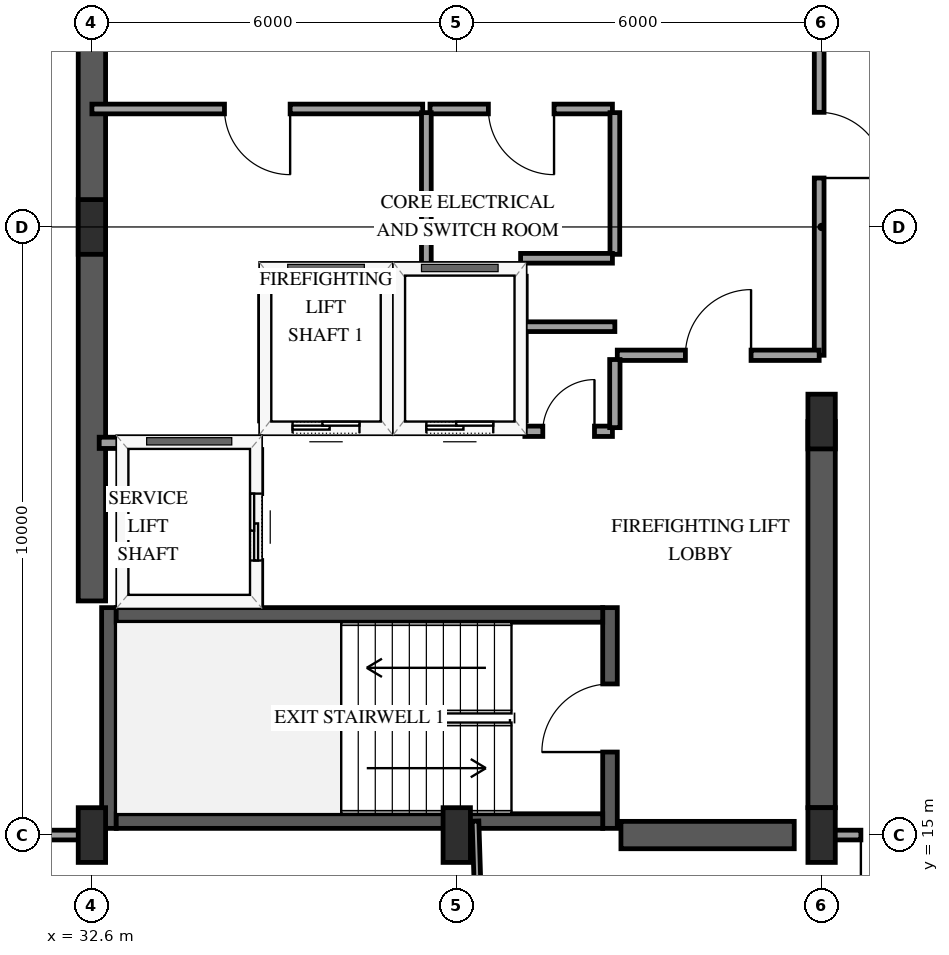
"""IFC4 building model, lengths in metres.
Left out: names, types, materials, properties, quantities, classifications, styles, units other than length and angle.
Written with IfcOpenShell. Run it as: python <this file> out.ifc"""

import sys

from ifc_helpers import new_model, si_unit, direction, frame, frame_2d, origin, origin_2d, place, context, subcontext, project, spatial, rectangle, extrude, element, fill, save


model = new_model("IFC4")
c1 = context("Model", 3, precision=1e-05, world=origin(), true_north=direction((0.0, 1.0)))
c2 = subcontext(c1, "Body", "Model", "MODEL_VIEW")
j1 = project(units=[si_unit("LENGTHUNIT", "METRE"), si_unit("PLANEANGLEUNIT", "RADIAN")], contexts=[c1])
p1 = place(None, origin())
s1 = spatial("IfcSite", under=j1, at=p1, CompositionType="ELEMENT")
p2 = place(p1, origin())
s2 = spatial("IfcBuilding", under=s1, at=p2, CompositionType="ELEMENT")
p3 = place(p2, frame((0.0, 0.0, 257.5)))
s3 = spatial("IfcBuildingStorey", under=s2, at=p3, CompositionType="ELEMENT", Elevation=257.5)
p4 = place(p3, frame((32.88, 15.11, 0.0), z_axis=(0.0, 0.0, 1.0), x_axis=(0.0, 1.0, 0.0)))
e1 = element("IfcWall", 1, at=p4, inside=s3, PredefinedType="SHEAR", context=c2, shape_type="SweptSolid", body=[
    extrude(rectangle(XDim=3.63, YDim=0.24, at=frame_2d((1.815, 0.0))), origin(), (0.0, 0.0, 1.0), 3.75),
])
p5 = place(p3, frame((41.12, 15.11, 0.0), z_axis=(0.0, 0.0, 1.0), x_axis=(0.0, 1.0, 0.0)))
e2 = element("IfcWall", 2, at=p5, inside=s3, PredefinedType="SHEAR", context=c2, shape_type="SweptSolid", body=[
    extrude(rectangle(XDim=3.63, YDim=0.24, at=frame_2d((1.815, 0.0))), origin(), (0.0, 0.0, 1.0), 3.75),
])
p6 = place(p5, frame((1.255, 0.0, 0.0)))
e3 = element("IfcOpeningElement", 3, at=p6, cuts=e2, PredefinedType="OPENING", context=c2, shape_type="SweptSolid", body=[
    extrude(rectangle(XDim=1.12, YDim=2.15, at=frame_2d((0.56, 1.075))), frame((0.0, 0.13, 0.0), z_axis=(0.0, -1.0, 0.0), x_axis=(1.0, 0.0, 0.0)), (0.0, 0.0, 1.0), 0.26),
])
for number, where, z_axis, x_axis in (
    (4, (33.0, 15.23, 0.0), (0.0, 0.0, 1.0), (1.0, 0.0, 0.0)),
    (5, (33.0, 18.62, 0.0), (0.0, 0.0, 1.0), (1.0, 0.0, 0.0)),
):
    element("IfcWall", number, at=place(p3, frame(where, z_axis=z_axis, x_axis=x_axis)), inside=s3, PredefinedType="SHEAR", context=c2, shape_type="SweptSolid", body=[
        extrude(rectangle(XDim=8.0, YDim=0.24, at=frame_2d((4.0, 0.0))), origin(), (0.0, 0.0, 1.0), 3.75),
    ])
p7 = place(p3, frame((32.6, 18.85, 0.0), z_axis=(0.0, 0.0, 1.0), x_axis=(0.0, 1.0, 0.0)))
e6 = element("IfcWall", 6, at=p7, inside=s3, PredefinedType="SHEAR", context=c2, shape_type="SweptSolid", body=[
    extrude(rectangle(XDim=12.3, YDim=0.45, at=frame_2d((6.15, 0.0))), origin(), (0.0, 0.0, 1.0), 3.75),
])
p8 = place(p3, frame((41.3, 15.0, 0.0), z_axis=(0.0, 0.0, 1.0), x_axis=(1.0, 0.0, 0.0)))
e7 = element("IfcWall", 7, at=p8, inside=s3, PredefinedType="SHEAR", context=c2, shape_type="SweptSolid", body=[
    extrude(rectangle(XDim=2.85, YDim=0.45, at=frame_2d((1.425, 0.0))), origin(), (0.0, 0.0, 1.0), 3.75),
])
p9 = place(p3, frame((44.6, 15.45, 0.0), z_axis=(0.0, 0.0, 1.0), x_axis=(0.0, 1.0, 0.0)))
e8 = element("IfcWall", 8, at=p9, inside=s3, PredefinedType="SHEAR", context=c2, shape_type="SweptSolid", body=[
    extrude(rectangle(XDim=6.35, YDim=0.45, at=frame_2d((3.175, 0.0))), origin(), (0.0, 0.0, 1.0), 3.75),
])
for number, where, z_axis, x_axis in (
    (9, (32.6, 15.0, 0.0), (0.0, 0.0, 1.0), (1.0, 0.0, 0.0)),
    (10, (32.6, 25.0, 0.0), (0.0, 0.0, 1.0), (1.0, 0.0, 0.0)),
    (11, (38.6, 15.0, 0.0), (0.0, 0.0, 1.0), (1.0, 0.0, 0.0)),
    (12, (44.6, 15.0, 0.0), (0.0, 0.0, 1.0), (1.0, 0.0, 0.0)),
    (13, (44.6, 21.8, 0.0), (0.0, 0.0, 1.0), (1.0, 0.0, 0.0)),
):
    element("IfcColumn", number, at=place(p3, frame(where, z_axis=z_axis, x_axis=x_axis)), inside=s3, PredefinedType="PILASTER", context=c2, shape_type="SweptSolid", body=[
        extrude(rectangle(XDim=0.45, YDim=0.9, at=origin_2d()), origin(), (0.0, 0.0, 1.0), 3.75),
    ])
p10 = place(p3, frame((35.45, 21.7, 0.0), z_axis=(0.0, 0.0, 1.0), x_axis=(1.0, 0.0, 0.0)))
e14 = element("IfcWall", 14, at=p10, inside=s3, PredefinedType="SOLIDWALL", context=c2, shape_type="SweptSolid", body=[
    extrude(rectangle(XDim=2.0, YDim=0.185, at=frame_2d((1.0, 0.0))), origin(), (0.0, 0.0, 1.0), 2.824),
])
p11 = place(p10, frame((0.45, 0.0, 0.0)))
e15 = element("IfcOpeningElement", 15, at=p11, cuts=e14, PredefinedType="OPENING", context=c2, shape_type="SweptSolid", body=[
    extrude(rectangle(XDim=1.1, YDim=2.15, at=frame_2d((0.55, 1.075))), frame((0.0, 0.103, 0.0), z_axis=(0.0, -1.0, 0.0), x_axis=(1.0, 0.0, 0.0)), (0.0, 0.0, 1.0), 0.205),
])
p12 = place(p3, frame((35.45, 24.3, 0.0), z_axis=(0.0, 0.0, 1.0), x_axis=(1.0, 0.0, 0.0)))
e16 = element("IfcWall", 16, at=p12, inside=s3, PredefinedType="SOLIDWALL", context=c2, shape_type="SweptSolid", body=[
    extrude(rectangle(XDim=2.0, YDim=0.185, at=frame_2d((1.0, 0.0))), origin(), (0.0, 0.0, 1.0), 2.824),
])
for number, where, z_axis, x_axis in (
    (17, (35.45, 21.81, 0.0), (0.0, 0.0, 1.0), (0.0, 1.0, 0.0)),
    (18, (37.45, 21.81, 0.0), (0.0, 0.0, 1.0), (0.0, 1.0, 0.0)),
):
    element("IfcWall", number, at=place(p3, frame(where, z_axis=z_axis, x_axis=x_axis)), inside=s3, PredefinedType="SOLIDWALL", context=c2, shape_type="SweptSolid", body=[
        extrude(rectangle(XDim=2.38, YDim=0.185, at=frame_2d((1.19, 0.0))), origin(), (0.0, 0.0, 1.0), 3.45),
    ])
p13 = place(p3, frame((37.65, 21.7, 0.0), z_axis=(0.0, 0.0, 1.0), x_axis=(1.0, 0.0, 0.0)))
e19 = element("IfcWall", 19, at=p13, inside=s3, PredefinedType="SOLIDWALL", context=c2, shape_type="SweptSolid", body=[
    extrude(rectangle(XDim=2.0, YDim=0.185, at=frame_2d((1.0, 0.0))), origin(), (0.0, 0.0, 1.0), 2.824),
])
p14 = place(p13, frame((0.45, 0.0, 0.0)))
e20 = element("IfcOpeningElement", 20, at=p14, cuts=e19, PredefinedType="OPENING", context=c2, shape_type="SweptSolid", body=[
    extrude(rectangle(XDim=1.1, YDim=2.15, at=frame_2d((0.55, 1.075))), frame((0.0, 0.103, 0.0), z_axis=(0.0, -1.0, 0.0), x_axis=(1.0, 0.0, 0.0)), (0.0, 0.0, 1.0), 0.205),
])
p15 = place(p3, frame((37.65, 24.3, 0.0), z_axis=(0.0, 0.0, 1.0), x_axis=(1.0, 0.0, 0.0)))
e21 = element("IfcWall", 21, at=p15, inside=s3, PredefinedType="SOLIDWALL", context=c2, shape_type="SweptSolid", body=[
    extrude(rectangle(XDim=2.0, YDim=0.185, at=frame_2d((1.0, 0.0))), origin(), (0.0, 0.0, 1.0), 2.824),
])
p16 = place(p3, frame((39.65, 21.81, 0.0), z_axis=(0.0, 0.0, 1.0), x_axis=(0.0, 1.0, 0.0)))
e22 = element("IfcWall", 22, at=p16, inside=s3, PredefinedType="SOLIDWALL", context=c2, shape_type="SweptSolid", body=[
    extrude(rectangle(XDim=2.38, YDim=0.185, at=frame_2d((1.19, 0.0))), origin(), (0.0, 0.0, 1.0), 3.45),
])
p17 = place(p3, frame((32.72, 21.45, 0.0), z_axis=(0.0, 0.0, 1.0), x_axis=(1.0, 0.0, 0.0)))
e23 = element("IfcWall", 23, at=p17, inside=s3, PredefinedType="SOLIDWALL", context=c2, shape_type="SweptSolid", body=[
    extrude(rectangle(XDim=2.58, YDim=0.185, at=frame_2d((1.29, 0.0))), origin(), (0.0, 0.0, 1.0), 2.824),
])
p18 = place(p3, frame((35.3, 18.79, 0.0), z_axis=(0.0, 0.0, 1.0), x_axis=(0.0, 1.0, 0.0)))
e24 = element("IfcWall", 24, at=p18, inside=s3, PredefinedType="SOLIDWALL", context=c2, shape_type="SweptSolid", body=[
    extrude(rectangle(XDim=2.55, YDim=0.185, at=frame_2d((1.275, 0.0))), origin(), (0.0, 0.0, 1.0), 3.45),
])
p19 = place(p18, frame((0.725, 0.0, 0.0)))
e25 = element("IfcOpeningElement", 25, at=p19, cuts=e24, PredefinedType="OPENING", context=c2, shape_type="SweptSolid", body=[
    extrude(rectangle(XDim=1.1, YDim=2.15, at=frame_2d((0.55, 1.075))), frame((0.0, 0.103, 0.0), z_axis=(0.0, -1.0, 0.0), x_axis=(1.0, 0.0, 0.0)), (0.0, 0.0, 1.0), 0.205),
])
p20 = place(p3, frame((38.908, 15.23, 0.0), z_axis=(0.0, 0.0, 1.0), x_axis=(0.03158331011, -0.999501122822, 0.0)))
e26 = element("IfcWall", 26, at=p20, inside=s3, PredefinedType="PARTITIONING", context=c2, shape_type="SweptSolid", body=[
    extrude(rectangle(XDim=7.282, YDim=0.11, at=frame_2d((3.641, 0.0))), origin(), (0.0, 0.0, 1.0), 3.45),
])
p21 = place(p3, frame((44.56, 29.8, 0.0), z_axis=(0.0, 0.0, 1.0), x_axis=(0.0, -1.0, 0.0)))
e27 = element("IfcWall", 27, at=p21, inside=s3, PredefinedType="PARTITIONING", context=c2, shape_type="SweptSolid", body=[
    extrude(rectangle(XDim=6.91, YDim=0.16, at=frame_2d((3.455, 0.0))), origin(), (0.0, 0.0, 1.0), 2.49),
])
p22 = place(p21, frame((2.915, 0.0, 0.0)))
e28 = element("IfcOpeningElement", 28, at=p22, cuts=e27, PredefinedType="OPENING", context=c2, shape_type="SweptSolid", body=[
    extrude(rectangle(XDim=1.08, YDim=2.15, at=frame_2d((0.54, 1.075))), frame((0.0, 0.09, 0.0), z_axis=(0.0, -1.0, 0.0), x_axis=(1.0, 0.0, 0.0)), (0.0, 0.0, 1.0), 0.18),
])
p23 = place(p3, frame((38.04, 26.94, 0.0), z_axis=(0.0, 0.0, 1.0), x_axis=(-1.0, 0.0, 0.0)))
e29 = element("IfcWall", 29, at=p23, inside=s3, PredefinedType="PARTITIONING", context=c2, shape_type="SweptSolid", body=[
    extrude(rectangle(XDim=5.44, YDim=0.16, at=frame_2d((2.72, 0.0))), origin(), (0.0, 0.0, 1.0), 3.45),
])
p24 = place(p23, frame((2.18, 0.0, 0.0)))
e30 = element("IfcOpeningElement", 30, at=p24, cuts=e29, PredefinedType="OPENING", context=c2, shape_type="SweptSolid", body=[
    extrude(rectangle(XDim=1.08, YDim=2.15, at=frame_2d((0.54, 1.075))), frame((0.0, 0.09, 0.0), z_axis=(0.0, -1.0, 0.0), x_axis=(1.0, 0.0, 0.0)), (0.0, 0.0, 1.0), 0.18),
])
p25 = place(p3, frame((41.24, 22.89, 0.0), z_axis=(0.0, 0.0, 1.0), x_axis=(1.0, 0.0, 0.0)))
e31 = element("IfcWall", 31, at=p25, inside=s3, PredefinedType="PARTITIONING", context=c2, shape_type="SweptSolid", body=[
    extrude(rectangle(XDim=3.32, YDim=0.17, at=frame_2d((1.66, 0.0))), origin(), (0.0, 0.0, 1.0), 3.45),
])
p26 = place(p25, frame((1.12, 0.0, 0.0)))
e32 = element("IfcOpeningElement", 32, at=p26, cuts=e31, PredefinedType="OPENING", context=c2, shape_type="SweptSolid", body=[
    extrude(rectangle(XDim=1.08, YDim=2.15, at=frame_2d((0.54, 1.075))), frame((0.0, 0.095, 0.0), z_axis=(0.0, -1.0, 0.0), x_axis=(1.0, 0.0, 0.0)), (0.0, 0.0, 1.0), 0.19),
])
p27 = place(p3, frame((41.16, 26.94, 0.0), z_axis=(0.0, 0.0, 1.0), x_axis=(-1.0, 0.0, 0.0)))
e33 = element("IfcWall", 33, at=p27, inside=s3, PredefinedType="PARTITIONING", context=c2, shape_type="SweptSolid", body=[
    extrude(rectangle(XDim=3.0, YDim=0.16, at=frame_2d((1.5, 0.0))), origin(), (0.0, 0.0, 1.0), 3.45),
])
p28 = place(p27, frame((0.96, 0.0, 0.0)))
e34 = element("IfcOpeningElement", 34, at=p28, cuts=e33, PredefinedType="OPENING", context=c2, shape_type="SweptSolid", body=[
    extrude(rectangle(XDim=1.08, YDim=2.15, at=frame_2d((0.54, 1.075))), frame((0.0, 0.09, 0.0), z_axis=(0.0, -1.0, 0.0), x_axis=(1.0, 0.0, 0.0)), (0.0, 0.0, 1.0), 0.18),
])
p29 = place(p3, frame((32.53, 15.0, 0.0), z_axis=(0.0, 0.0, 1.0), x_axis=(-1.0, 0.0, 0.0)))
e35 = element("IfcWall", 35, at=p29, inside=s3, PredefinedType="PARTITIONING", context=c2, shape_type="SweptSolid", body=[
    extrude(rectangle(XDim=2.609, YDim=0.16, at=frame_2d((1.305, 0.0))), origin(), (0.0, 0.0, 1.0), 3.45),
])
p30 = place(p29, frame((0.83, 0.0, 0.0)))
e36 = element("IfcOpeningElement", 36, at=p30, cuts=e35, PredefinedType="OPENING", context=c2, shape_type="SweptSolid", body=[
    extrude(rectangle(XDim=0.95, YDim=2.15, at=frame_2d((0.475, 1.075))), frame((0.0, 0.09, 0.0), z_axis=(0.0, -1.0, 0.0), x_axis=(1.0, 0.0, 0.0)), (0.0, 0.0, 1.0), 0.18),
])
p31 = place(p3, frame((38.1, 26.88, 0.0), z_axis=(0.0, 0.0, 1.0), x_axis=(0.0, -1.0, 0.0)))
e37 = element("IfcWall", 37, at=p31, inside=s3, PredefinedType="PARTITIONING", context=c2, shape_type="SweptSolid", body=[
    extrude(rectangle(XDim=2.58, YDim=0.16, at=frame_2d((1.29, 0.0))), origin(), (0.0, 0.0, 1.0), 3.45),
])
p32 = place(p3, frame((41.2, 24.55, 0.0), z_axis=(0.0, 0.0, 1.0), x_axis=(0.0, 1.0, 0.0)))
e38 = element("IfcWall", 38, at=p32, inside=s3, PredefinedType="PARTITIONING", context=c2, shape_type="SweptSolid", body=[
    extrude(rectangle(XDim=2.33, YDim=0.16, at=frame_2d((1.165, 0.0))), origin(), (0.0, 0.0, 1.0), 3.45),
])
p33 = place(p3, frame((46.58, 15.0, 0.0), z_axis=(0.0, 0.0, 1.0), x_axis=(-1.0, 0.0, 0.0)))
e39 = element("IfcWall", 39, at=p33, inside=s3, PredefinedType="PARTITIONING", context=c2, shape_type="SweptSolid", body=[
    extrude(rectangle(XDim=1.91, YDim=0.16, at=frame_2d((0.955, 0.0))), origin(), (0.0, 0.0, 1.0), 3.45),
])
p34 = place(p33, frame((0.384, 0.0, 0.0)))
e40 = element("IfcOpeningElement", 40, at=p34, cuts=e39, PredefinedType="OPENING", context=c2, shape_type="SweptSolid", body=[
    extrude(rectangle(XDim=0.95, YDim=2.15, at=frame_2d((0.475, 1.075))), frame((0.0, 0.09, 0.0), z_axis=(0.0, -1.0, 0.0), x_axis=(1.0, 0.0, 0.0)), (0.0, 0.0, 1.0), 0.18),
])
p35 = place(p3, frame((39.65, 24.485, 0.0), z_axis=(0.0, 0.0, 1.0), x_axis=(1.0, 0.0, 0.0)))
e41 = element("IfcWall", 41, at=p35, inside=s3, PredefinedType="PARTITIONING", context=c2, shape_type="SweptSolid", body=[
    extrude(rectangle(XDim=1.51, YDim=0.16, at=frame_2d((0.755, 0.0))), origin(), (0.0, 0.0, 1.0), 2.824),
])
p36 = place(p3, frame((39.72, 21.64, 0.0), z_axis=(0.0, 0.0, 1.0), x_axis=(1.0, 0.0, 0.0)))
e42 = element("IfcWall", 42, at=p36, inside=s3, PredefinedType="PARTITIONING", context=c2, shape_type="SweptSolid", body=[
    extrude(rectangle(XDim=1.44, YDim=0.17, at=frame_2d((0.72, 0.0))), origin(), (0.0, 0.0, 1.0), 2.824),
])
p37 = place(p36, frame((0.295, 0.0, 0.0)))
e43 = element("IfcOpeningElement", 43, at=p37, cuts=e42, PredefinedType="OPENING", context=c2, shape_type="SweptSolid", body=[
    extrude(rectangle(XDim=0.85, YDim=2.1, at=frame_2d((0.425, 1.05))), frame((0.0, 0.095, 0.0), z_axis=(0.0, -1.0, 0.0), x_axis=(1.0, 0.0, 0.0)), (0.0, 0.0, 1.0), 0.19),
])
p38 = place(p3, frame((41.2, 21.7, 0.0), z_axis=(0.0, 0.0, 1.0), x_axis=(0.0, 1.0, 0.0)))
e44 = element("IfcWall", 44, at=p38, inside=s3, PredefinedType="PARTITIONING", context=c2, shape_type="SweptSolid", body=[
    extrude(rectangle(XDim=1.12, YDim=0.17, at=frame_2d((0.56, 0.0))), origin(), (0.0, 0.0, 1.0), 3.45),
])
p39 = place(p3, frame((41.2, 23.36, 0.0), z_axis=(0.0, 0.0, 1.0), x_axis=(-1.0, 0.0, 0.0)))
e45 = element("IfcWall", 45, at=p39, inside=s3, PredefinedType="PARTITIONING", context=c2, shape_type="SweptSolid", body=[
    extrude(rectangle(XDim=1.48, YDim=0.16, at=frame_2d((0.74, 0.0))), origin(), (0.0, 0.0, 1.0), 3.45),
])
p40 = place(p11, origin())
e46 = element("IfcDoor", 46, at=p40, inside=s3, OperationType="SLIDING_TO_LEFT", PredefinedType="DOOR", context=c2, shape_type="SweptSolid", body=[
    extrude(rectangle(XDim=1.1, YDim=2.15, at=frame_2d((0.55, 1.075))), frame((0.0, 0.025, 0.0), z_axis=(0.0, -1.0, 0.0), x_axis=(1.0, 0.0, 0.0)), (0.0, 0.0, 1.0), 0.05),
])
fill(e15, e46)
p41 = place(p14, origin())
e47 = element("IfcDoor", 47, at=p41, inside=s3, OperationType="SLIDING_TO_LEFT", PredefinedType="DOOR", context=c2, shape_type="SweptSolid", body=[
    extrude(rectangle(XDim=1.1, YDim=2.15, at=frame_2d((0.55, 1.075))), frame((0.0, 0.025, 0.0), z_axis=(0.0, -1.0, 0.0), x_axis=(1.0, 0.0, 0.0)), (0.0, 0.0, 1.0), 0.05),
])
fill(e20, e47)
p42 = place(p19, origin())
e48 = element("IfcDoor", 48, at=p42, inside=s3, OperationType="SLIDING_TO_LEFT", PredefinedType="DOOR", context=c2, shape_type="SweptSolid", body=[
    extrude(rectangle(XDim=1.1, YDim=2.15, at=frame_2d((0.55, 1.075))), frame((0.0, 0.025, 0.0), z_axis=(0.0, -1.0, 0.0), x_axis=(1.0, 0.0, 0.0)), (0.0, 0.0, 1.0), 0.05),
])
fill(e25, e48)
p43 = place(p6, origin())
e49 = element("IfcDoor", 49, at=p43, inside=s3, OperationType="SINGLE_SWING_LEFT", PredefinedType="DOOR", context=c2, shape_type="SweptSolid", body=[
    extrude(rectangle(XDim=1.12, YDim=2.15, at=frame_2d((0.56, 1.075))), frame((0.0, 0.025, 0.0), z_axis=(0.0, -1.0, 0.0), x_axis=(1.0, 0.0, 0.0)), (0.0, 0.0, 1.0), 0.05),
])
fill(e3, e49)
p44 = place(p22, origin())
e50 = element("IfcDoor", 50, at=p44, inside=s3, OperationType="SINGLE_SWING_RIGHT", PredefinedType="DOOR", context=c2, shape_type="SweptSolid", body=[
    extrude(rectangle(XDim=1.08, YDim=2.15, at=frame_2d((0.54, 1.075))), frame((0.0, 0.025, 0.0), z_axis=(0.0, -1.0, 0.0), x_axis=(1.0, 0.0, 0.0)), (0.0, 0.0, 1.0), 0.05),
])
fill(e28, e50)
p45 = place(p24, origin())
e51 = element("IfcDoor", 51, at=p45, inside=s3, OperationType="SINGLE_SWING_LEFT", PredefinedType="DOOR", context=c2, shape_type="SweptSolid", body=[
    extrude(rectangle(XDim=1.08, YDim=2.15, at=frame_2d((0.54, 1.075))), frame((0.0, 0.025, 0.0), z_axis=(0.0, -1.0, 0.0), x_axis=(1.0, 0.0, 0.0)), (0.0, 0.0, 1.0), 0.05),
])
fill(e30, e51)
p46 = place(p26, origin())
e52 = element("IfcDoor", 52, at=p46, inside=s3, OperationType="SINGLE_SWING_RIGHT", PredefinedType="DOOR", context=c2, shape_type="SweptSolid", body=[
    extrude(rectangle(XDim=1.08, YDim=2.15, at=frame_2d((0.54, 1.075))), frame((0.0, 0.025, 0.0), z_axis=(0.0, -1.0, 0.0), x_axis=(1.0, 0.0, 0.0)), (0.0, 0.0, 1.0), 0.05),
])
fill(e32, e52)
p47 = place(p28, origin())
e53 = element("IfcDoor", 53, at=p47, inside=s3, OperationType="SINGLE_SWING_LEFT", PredefinedType="DOOR", context=c2, shape_type="SweptSolid", body=[
    extrude(rectangle(XDim=1.08, YDim=2.15, at=frame_2d((0.54, 1.075))), frame((0.0, 0.025, 0.0), z_axis=(0.0, -1.0, 0.0), x_axis=(1.0, 0.0, 0.0)), (0.0, 0.0, 1.0), 0.05),
])
fill(e34, e53)
p48 = place(p34, origin())
e54 = element("IfcDoor", 54, at=p48, inside=s3, OperationType="SINGLE_SWING_RIGHT", PredefinedType="DOOR", context=c2, shape_type="SweptSolid", body=[
    extrude(rectangle(XDim=0.95, YDim=2.15, at=frame_2d((0.475, 1.075))), frame((0.0, 0.025, 0.0), z_axis=(0.0, -1.0, 0.0), x_axis=(1.0, 0.0, 0.0)), (0.0, 0.0, 1.0), 0.05),
])
fill(e40, e54)
p49 = place(p37, origin())
e55 = element("IfcDoor", 55, at=p49, inside=s3, OperationType="SINGLE_SWING_RIGHT", PredefinedType="DOOR", context=c2, shape_type="SweptSolid", body=[
    extrude(rectangle(XDim=0.85, YDim=2.1, at=frame_2d((0.425, 1.05))), frame((0.0, 0.025, 0.0), z_axis=(0.0, -1.0, 0.0), x_axis=(1.0, 0.0, 0.0)), (0.0, 0.0, 1.0), 0.05),
])
fill(e43, e55)
save(model, sys.argv[1])
